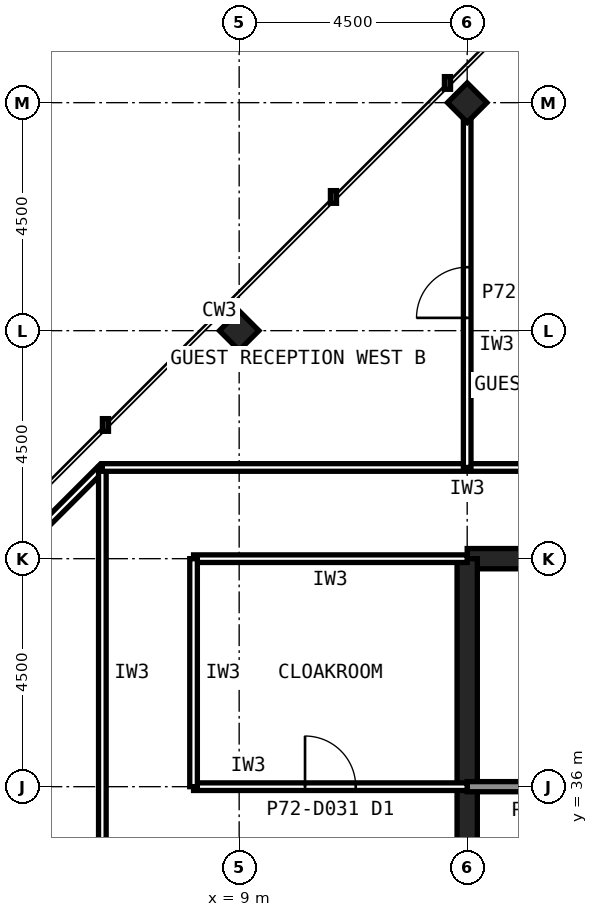
"""IFC4 building model, lengths in metres.
Left out: names, types, materials, properties, quantities, classifications, styles, units other than length and angle.
Written with IfcOpenShell. Run it as: python <this file> out.ifc"""

import sys

from ifc_helpers import new_model, si_unit, direction, frame, frame_2d, origin, origin_2d, place, context, subcontext, project, spatial, rectangle, hollow_rectangle, extrude, element, fill, save


model = new_model("IFC4")
c1 = context("Model", 3, precision=1e-05, world=origin(), true_north=direction((0.0, 1.0)))
c2 = subcontext(c1, "Body", "Model", "MODEL_VIEW")
j1 = project(units=[si_unit("LENGTHUNIT", "METRE"), si_unit("PLANEANGLEUNIT", "RADIAN")], contexts=[c1])
p1 = place(None, origin())
s1 = spatial("IfcSite", under=j1, at=p1, CompositionType="ELEMENT")
p2 = place(p1, origin())
s2 = spatial("IfcBuilding", under=s1, at=p2, CompositionType="ELEMENT")
p3 = place(p2, frame((0.0, 0.0, 302.6)))
s3 = spatial("IfcBuildingStorey", under=s2, at=p3, CompositionType="ELEMENT", Elevation=302.6)
for number, where, z_axis, x_axis in (
    (1, (9.0, 45.0, 0.0), (0.0, 0.0, 1.0), (0.707, 0.707, 0.0)),
    (2, (13.5, 49.5, 0.0), (0.0, 0.0, 1.0), (0.707, 0.707, 0.0)),
):
    element("IfcColumn", number, at=place(p3, frame(where, z_axis=z_axis, x_axis=x_axis)), inside=s3, PredefinedType="COLUMN", context=c2, shape_type="SweptSolid", body=[
        extrude(hollow_rectangle(XDim=0.55, YDim=0.55, WallThickness=0.025, at=origin_2d()), origin(), (0.0, 0.0, 1.0), 4.0),
    ])
p4 = place(p3, frame((40.5, 40.5, 0.0), z_axis=(0.0, 0.0, 1.0), x_axis=(-1.0, 0.0, 0.0)))
e3 = element("IfcWall", 3, at=p4, inside=s3, PredefinedType="SHEAR", context=c2, shape_type="SweptSolid", body=[
    extrude(rectangle(XDim=27.0, YDim=0.4, at=frame_2d((13.5, 0.0))), origin(), (0.0, 0.0, 1.0), 4.0),
])
p5 = place(p3, frame((13.5, 40.5, 0.0), z_axis=(0.0, 0.0, 1.0), x_axis=(0.0, -1.0, 0.0)))
e4 = element("IfcWall", 4, at=p5, inside=s3, PredefinedType="SHEAR", context=c2, shape_type="SweptSolid", body=[
    extrude(rectangle(XDim=27.0, YDim=0.4, at=frame_2d((13.5, 0.0))), origin(), (0.0, 0.0, 1.0), 4.0),
])
p6 = place(p5, frame((19.65, 0.0, 0.0)))
e5 = element("IfcOpeningElement", 5, at=p6, cuts=e4, PredefinedType="OPENING", context=c2, shape_type="SweptSolid", body=[
    extrude(rectangle(XDim=1.2, YDim=2.1, at=frame_2d((0.6, 1.05))), frame((0.0, 0.21, 0.0), z_axis=(0.0, -1.0, 0.0), x_axis=(1.0, 0.0, 0.0)), (0.0, 0.0, 1.0), 0.42),
])
p7 = place(p5, frame((5.85, 0.0, 0.0)))
e6 = element("IfcOpeningElement", 6, at=p7, cuts=e4, PredefinedType="OPENING", context=c2, shape_type="SweptSolid", body=[
    extrude(rectangle(XDim=1.8, YDim=2.1, at=frame_2d((0.9, 1.05))), frame((0.0, 0.21, 0.0), z_axis=(0.0, -1.0, 0.0), x_axis=(1.0, 0.0, 0.0)), (0.0, 0.0, 1.0), 0.42),
])
p8 = place(p3, frame((13.5, 36.0, 0.0), z_axis=(0.0, 0.0, 1.0), x_axis=(1.0, 0.0, 0.0)))
e7 = element("IfcWall", 7, at=p8, inside=s3, PredefinedType="SOLIDWALL", context=c2, shape_type="SweptSolid", body=[
    extrude(rectangle(XDim=27.0, YDim=0.2, at=frame_2d((13.5, 0.0))), origin(), (0.0, 0.0, 1.0), 3.84),
])
p9 = place(p8, frame((1.8, 0.0, 0.0)))
e8 = element("IfcOpeningElement", 8, at=p9, cuts=e7, PredefinedType="OPENING", context=c2, shape_type="SweptSolid", body=[
    extrude(rectangle(XDim=0.9, YDim=2.1, at=frame_2d((0.45, 1.05))), frame((0.0, 0.11, 0.0), z_axis=(0.0, -1.0, 0.0), x_axis=(1.0, 0.0, 0.0)), (0.0, 0.0, 1.0), 0.22),
])
p10 = place(p8, frame((5.55, 0.0, 0.0)))
e9 = element("IfcOpeningElement", 9, at=p10, cuts=e7, PredefinedType="OPENING", context=c2, shape_type="SweptSolid", body=[
    extrude(rectangle(XDim=0.9, YDim=2.1, at=frame_2d((0.45, 1.05))), frame((0.0, 0.11, 0.0), z_axis=(0.0, -1.0, 0.0), x_axis=(1.0, 0.0, 0.0)), (0.0, 0.0, 1.0), 0.22),
])
p11 = place(p8, frame((14.55, 0.0, 0.0)))
e10 = element("IfcOpeningElement", 10, at=p11, cuts=e7, PredefinedType="OPENING", context=c2, shape_type="SweptSolid", body=[
    extrude(rectangle(XDim=0.9, YDim=2.1, at=frame_2d((0.45, 1.05))), frame((0.0, 0.11, 0.0), z_axis=(0.0, -1.0, 0.0), x_axis=(1.0, 0.0, 0.0)), (0.0, 0.0, 1.0), 0.22),
])
p12 = place(p8, frame((17.55, 0.0, 0.0)))
e11 = element("IfcOpeningElement", 11, at=p12, cuts=e7, PredefinedType="OPENING", context=c2, shape_type="SweptSolid", body=[
    extrude(rectangle(XDim=0.9, YDim=2.1, at=frame_2d((0.45, 1.05))), frame((0.0, 0.11, 0.0), z_axis=(0.0, -1.0, 0.0), x_axis=(1.0, 0.0, 0.0)), (0.0, 0.0, 1.0), 0.22),
])
p13 = place(p8, frame((20.55, 0.0, 0.0)))
e12 = element("IfcOpeningElement", 12, at=p13, cuts=e7, PredefinedType="OPENING", context=c2, shape_type="SweptSolid", body=[
    extrude(rectangle(XDim=0.9, YDim=2.1, at=frame_2d((0.45, 1.05))), frame((0.0, 0.11, 0.0), z_axis=(0.0, -1.0, 0.0), x_axis=(1.0, 0.0, 0.0)), (0.0, 0.0, 1.0), 0.22),
])
p14 = place(p8, frame((24.1, 0.0, 0.0)))
e13 = element("IfcOpeningElement", 13, at=p14, cuts=e7, PredefinedType="OPENING", context=c2, shape_type="SweptSolid", body=[
    extrude(rectangle(XDim=1.3, YDim=2.2, at=frame_2d((0.65, 1.1))), frame((0.0, 0.11, 0.0), z_axis=(0.0, -1.0, 0.0), x_axis=(1.0, 0.0, 0.0)), (0.0, 0.0, 1.0), 0.22),
])
p15 = place(p3, frame((0.201, 36.201, 0.0), z_axis=(0.0, 0.0, 1.0), x_axis=(0.707106781187, 0.707106781187, 0.0)))
e14 = element("IfcWall", 14, at=p15, inside=s3, PredefinedType="PARTITIONING", context=c2, shape_type="SweptSolid", body=[
    extrude(rectangle(XDim=8.625, YDim=0.15, at=frame_2d((4.312, 0.0))), origin(), (0.0, 0.0, 1.0), 3.223),
])
p16 = place(p3, frame((6.3, 42.3, 0.0), z_axis=(0.0, 0.0, 1.0), x_axis=(0.0, -1.0, 0.0)))
e15 = element("IfcWall", 15, at=p16, inside=s3, PredefinedType="PARTITIONING", context=c2, shape_type="SweptSolid", body=[
    extrude(rectangle(XDim=8.1, YDim=0.15, at=frame_2d((4.05, 0.0))), origin(), (0.0, 0.0, 1.0), 3.84),
])
p17 = place(p3, frame((20.7, 42.3, 0.0), z_axis=(0.0, 0.0, 1.0), x_axis=(-1.0, 0.0, 0.0)))
e16 = element("IfcWall", 16, at=p17, inside=s3, PredefinedType="PARTITIONING", context=c2, shape_type="SweptSolid", body=[
    extrude(rectangle(XDim=14.4, YDim=0.15, at=frame_2d((7.2, 0.0))), origin(), (0.0, 0.0, 1.0), 3.84),
])
p18 = place(p3, frame((8.1, 36.0, 0.0), z_axis=(0.0, 0.0, 1.0), x_axis=(1.0, 0.0, 0.0)))
e17 = element("IfcWall", 17, at=p18, inside=s3, PredefinedType="PARTITIONING", context=c2, shape_type="SweptSolid", body=[
    extrude(rectangle(XDim=5.4, YDim=0.15, at=frame_2d((2.7, 0.0))), origin(), (0.0, 0.0, 1.0), 2.989),
])
p19 = place(p18, frame((2.2, 0.0, 0.0)))
e18 = element("IfcOpeningElement", 18, at=p19, cuts=e17, PredefinedType="OPENING", context=c2, shape_type="SweptSolid", body=[
    extrude(rectangle(XDim=1.0, YDim=2.1, at=frame_2d((0.5, 1.05))), frame((0.0, 0.085, 0.0), z_axis=(0.0, -1.0, 0.0), x_axis=(1.0, 0.0, 0.0)), (0.0, 0.0, 1.0), 0.17),
])
p20 = place(p3, frame((13.5, 40.5, 0.0), z_axis=(0.0, 0.0, 1.0), x_axis=(-1.0, 0.0, 0.0)))
e19 = element("IfcWall", 19, at=p20, inside=s3, PredefinedType="PARTITIONING", context=c2, shape_type="SweptSolid", body=[
    extrude(rectangle(XDim=5.4, YDim=0.15, at=frame_2d((2.7, 0.0))), origin(), (0.0, 0.0, 1.0), 2.989),
])
p21 = place(p3, frame((8.1, 40.5, 0.0), z_axis=(0.0, 0.0, 1.0), x_axis=(0.0, -1.0, 0.0)))
e20 = element("IfcWall", 20, at=p21, inside=s3, PredefinedType="PARTITIONING", context=c2, shape_type="SweptSolid", body=[
    extrude(rectangle(XDim=4.5, YDim=0.15, at=frame_2d((2.25, 0.0))), origin(), (0.0, 0.0, 1.0), 3.84),
])
p22 = place(p3, frame((13.5, 42.3, 0.0), z_axis=(0.0, 0.0, 1.0), x_axis=(0.0, 1.0, 0.0)))
e21 = element("IfcWall", 21, at=p22, inside=s3, PredefinedType="PARTITIONING", context=c2, shape_type="SweptSolid", body=[
    extrude(rectangle(XDim=6.905, YDim=0.15, at=frame_2d((3.453, 0.0))), origin(), (0.0, 0.0, 1.0), 2.989),
])
p23 = place(p22, frame((2.952, 0.0, 0.0)))
e22 = element("IfcOpeningElement", 22, at=p23, cuts=e21, PredefinedType="OPENING", context=c2, shape_type="SweptSolid", body=[
    extrude(rectangle(XDim=1.0, YDim=2.1, at=frame_2d((0.5, 1.05))), frame((0.0, 0.085, 0.0), z_axis=(0.0, -1.0, 0.0), x_axis=(1.0, 0.0, 0.0)), (0.0, 0.0, 1.0), 0.17),
])
p24 = place(p19, origin())
e23 = element("IfcDoor", 23, at=p24, inside=s3, OperationType="SINGLE_SWING_LEFT", PredefinedType="DOOR", context=c2, shape_type="SweptSolid", body=[
    extrude(rectangle(XDim=1.0, YDim=2.1, at=frame_2d((0.5, 1.05))), frame((0.0, 0.025, 0.0), z_axis=(0.0, -1.0, 0.0), x_axis=(1.0, 0.0, 0.0)), (0.0, 0.0, 1.0), 0.05),
])
fill(e18, e23)
p25 = place(p23, origin())
e24 = element("IfcDoor", 24, at=p25, inside=s3, OperationType="SINGLE_SWING_LEFT", PredefinedType="DOOR", context=c2, shape_type="SweptSolid", body=[
    extrude(rectangle(XDim=1.0, YDim=2.1, at=frame_2d((0.5, 1.05))), frame((0.0, 0.025, 0.0), z_axis=(0.0, -1.0, 0.0), x_axis=(1.0, 0.0, 0.0)), (0.0, 0.0, 1.0), 0.05),
])
fill(e22, e24)
save(model, sys.argv[1])
